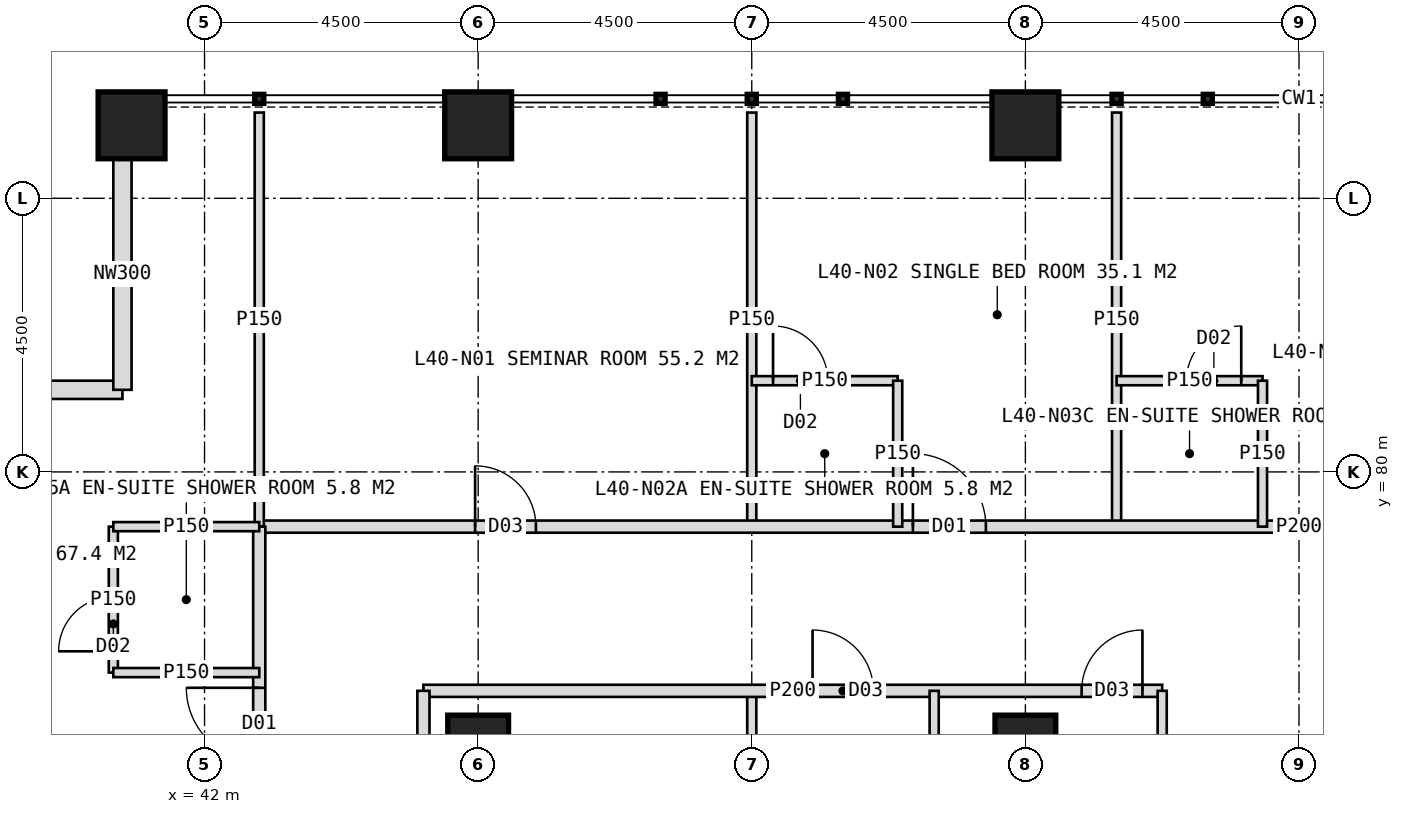
"""IFC4 building model, lengths in metres.
Left out: names, types, materials, properties, quantities, classifications, styles, units other than length and angle.
Written with IfcOpenShell. Run it as: python <this file> out.ifc"""

import sys

from ifc_helpers import new_model, si_unit, direction, frame, frame_2d, origin, origin_2d, place, context, subcontext, project, spatial, rectangle, hollow_rectangle, extrude, element, fill, save


model = new_model("IFC4")
c1 = context("Model", 3, precision=1e-05, world=origin(), true_north=direction((0.0, 1.0)))
c2 = subcontext(c1, "Body", "Model", "MODEL_VIEW")
j1 = project(units=[si_unit("LENGTHUNIT", "METRE"), si_unit("PLANEANGLEUNIT", "RADIAN")], contexts=[c1])
p1 = place(None, origin())
s1 = spatial("IfcSite", under=j1, at=p1, CompositionType="ELEMENT")
p2 = place(p1, origin())
s2 = spatial("IfcBuilding", under=s1, at=p2, CompositionType="ELEMENT")
p3 = place(p2, frame((0.0, 0.0, 168.0)))
s3 = spatial("IfcBuildingStorey", under=s2, at=p3, CompositionType="ELEMENT", Elevation=168.0)
for number, where, z_axis, x_axis in (
    (1, (46.5, 75.5, 0.0), (0.0, 0.0, 1.0), (1.0, 0.0, 0.0)),
    (2, (55.5, 75.5, 0.0), (0.0, 0.0, 1.0), (1.0, 0.0, 0.0)),
):
    element("IfcColumn", number, at=place(p3, frame(where, z_axis=z_axis, x_axis=x_axis)), inside=s3, PredefinedType="COLUMN", context=c2, shape_type="SweptSolid", body=[
        extrude(hollow_rectangle(XDim=1.0, YDim=1.0, WallThickness=0.1, at=origin_2d()), origin(), (0.0, 0.0, 1.0), 4.0),
    ])
for number, where, z_axis, x_axis in (
    (3, (40.8, 85.7, 0.0), (0.0, 0.0, 1.0), (1.0, 0.0, 0.0)),
    (4, (46.5, 85.7, 0.0), (0.0, 0.0, 1.0), (1.0, 0.0, 0.0)),
    (5, (55.5, 85.7, 0.0), (0.0, 0.0, 1.0), (1.0, 0.0, 0.0)),
):
    element("IfcColumn", number, at=place(p3, frame(where, z_axis=z_axis, x_axis=x_axis)), inside=s3, PredefinedType="COLUMN", context=c2, shape_type="SweptSolid", body=[
        extrude(hollow_rectangle(XDim=1.1, YDim=1.1, WallThickness=0.1, at=origin_2d()), origin(), (0.0, 0.0, 1.0), 4.0),
    ])
for number, where, z_axis, x_axis in (
    (6, (36.85, 81.35, 0.0), (0.0, 0.0, 1.0), (1.0, 0.0, 0.0)),
    (7, (40.65, 81.35, 0.0), (0.0, 0.0, 1.0), (0.0, 1.0, 0.0)),
):
    element("IfcWall", number, at=place(p3, frame(where, z_axis=z_axis, x_axis=x_axis)), inside=s3, PredefinedType="ELEMENTEDWALL", context=c2, shape_type="SweptSolid", body=[
        extrude(rectangle(XDim=3.8, YDim=0.3, at=frame_2d((1.9, 0.0))), origin(), (0.0, 0.0, 1.0), 4.0),
    ])
for number, where, z_axis, x_axis in (
    (8, (51.0, 79.1, 0.0), (0.0, 0.0, 1.0), (0.0, 1.0, 0.0)),
    (9, (57.0, 79.1, 0.0), (0.0, 0.0, 1.0), (0.0, 1.0, 0.0)),
):
    element("IfcWall", number, at=place(p3, frame(where, z_axis=z_axis, x_axis=x_axis)), inside=s3, PredefinedType="PARTITIONING", context=c2, shape_type="SweptSolid", body=[
        extrude(rectangle(XDim=6.81, YDim=0.15, at=frame_2d((3.405, 0.0))), origin(), (0.0, 0.0, 1.0), 3.75),
    ])
p4 = place(p3, frame((42.9, 79.1, 0.0), z_axis=(0.0, 0.0, 1.0), x_axis=(1.0, 0.0, 0.0)))
e10 = element("IfcWall", 10, at=p4, inside=s3, PredefinedType="PARTITIONING", context=c2, shape_type="SweptSolid", body=[
    extrude(rectangle(XDim=34.2, YDim=0.2, at=frame_2d((17.1, 0.0))), origin(), (0.0, 0.0, 1.0), 3.75),
])
p5 = place(p4, frame((3.55, 0.0, 0.0)))
e11 = element("IfcOpeningElement", 11, at=p5, cuts=e10, PredefinedType="OPENING", context=c2, shape_type="SweptSolid", body=[
    extrude(rectangle(XDim=1.0, YDim=2.1, at=frame_2d((0.5, 1.05))), frame((0.0, 0.11, 0.0), z_axis=(0.0, -1.0, 0.0), x_axis=(1.0, 0.0, 0.0)), (0.0, 0.0, 1.0), 0.22),
])
p6 = place(p4, frame((10.75, 0.0, 0.0)))
e12 = element("IfcOpeningElement", 12, at=p6, cuts=e10, PredefinedType="OPENING", context=c2, shape_type="SweptSolid", body=[
    extrude(rectangle(XDim=1.2, YDim=2.2, at=frame_2d((0.6, 1.1))), frame((0.0, 0.11, 0.0), z_axis=(0.0, -1.0, 0.0), x_axis=(1.0, 0.0, 0.0)), (0.0, 0.0, 1.0), 0.22),
])
p7 = place(p4, frame((20.75, 0.0, 0.0)))
e13 = element("IfcOpeningElement", 13, at=p7, cuts=e10, PredefinedType="OPENING", context=c2, shape_type="SweptSolid", body=[
    extrude(rectangle(XDim=1.2, YDim=2.2, at=frame_2d((0.6, 1.1))), frame((0.0, 0.11, 0.0), z_axis=(0.0, -1.0, 0.0), x_axis=(1.0, 0.0, 0.0)), (0.0, 0.0, 1.0), 0.22),
])
p8 = place(p4, frame((27.25, 0.0, 0.0)))
e14 = element("IfcOpeningElement", 14, at=p8, cuts=e10, PredefinedType="OPENING", context=c2, shape_type="SweptSolid", body=[
    extrude(rectangle(XDim=1.2, YDim=2.2, at=frame_2d((0.6, 1.1))), frame((0.0, 0.11, 0.0), z_axis=(0.0, -1.0, 0.0), x_axis=(1.0, 0.0, 0.0)), (0.0, 0.0, 1.0), 0.22),
])
p9 = place(p3, frame((42.9, 79.1, 0.0), z_axis=(0.0, 0.0, 1.0), x_axis=(0.0, 1.0, 0.0)))
e15 = element("IfcWall", 15, at=p9, inside=s3, PredefinedType="PARTITIONING", context=c2, shape_type="SweptSolid", body=[
    extrude(rectangle(XDim=6.81, YDim=0.15, at=frame_2d((3.405, 0.0))), origin(), (0.0, 0.0, 1.0), 3.75),
])
p10 = place(p3, frame((51.0, 81.5, 0.0), z_axis=(0.0, 0.0, 1.0), x_axis=(1.0, 0.0, 0.0)))
e16 = element("IfcWall", 16, at=p10, inside=s3, PredefinedType="PARTITIONING", context=c2, shape_type="SweptSolid", body=[
    extrude(rectangle(XDim=2.4, YDim=0.15, at=frame_2d((1.2, 0.0))), origin(), (0.0, 0.0, 1.0), 3.75),
])
p11 = place(p10, frame((0.35, 0.0, 0.0)))
e17 = element("IfcOpeningElement", 17, at=p11, cuts=e16, PredefinedType="OPENING", context=c2, shape_type="SweptSolid", body=[
    extrude(rectangle(XDim=0.9, YDim=2.1, at=frame_2d((0.45, 1.05))), frame((0.0, 0.085, 0.0), z_axis=(0.0, -1.0, 0.0), x_axis=(1.0, 0.0, 0.0)), (0.0, 0.0, 1.0), 0.17),
])
p12 = place(p3, frame((53.4, 79.1, 0.0), z_axis=(0.0, 0.0, 1.0), x_axis=(0.0, 1.0, 0.0)))
e18 = element("IfcWall", 18, at=p12, inside=s3, PredefinedType="PARTITIONING", context=c2, shape_type="SweptSolid", body=[
    extrude(rectangle(XDim=2.4, YDim=0.15, at=frame_2d((1.2, 0.0))), origin(), (0.0, 0.0, 1.0), 3.75),
])
p13 = place(p3, frame((57.0, 81.5, 0.0), z_axis=(0.0, 0.0, 1.0), x_axis=(1.0, 0.0, 0.0)))
e19 = element("IfcWall", 19, at=p13, inside=s3, PredefinedType="PARTITIONING", context=c2, shape_type="SweptSolid", body=[
    extrude(rectangle(XDim=2.4, YDim=0.15, at=frame_2d((1.2, 0.0))), origin(), (0.0, 0.0, 1.0), 3.75),
])
p14 = place(p13, frame((1.15, 0.0, 0.0)))
e20 = element("IfcOpeningElement", 20, at=p14, cuts=e19, PredefinedType="OPENING", context=c2, shape_type="SweptSolid", body=[
    extrude(rectangle(XDim=0.9, YDim=2.1, at=frame_2d((0.45, 1.05))), frame((0.0, 0.085, 0.0), z_axis=(0.0, -1.0, 0.0), x_axis=(1.0, 0.0, 0.0)), (0.0, 0.0, 1.0), 0.17),
])
p15 = place(p3, frame((59.4, 79.1, 0.0), z_axis=(0.0, 0.0, 1.0), x_axis=(0.0, 1.0, 0.0)))
e21 = element("IfcWall", 21, at=p15, inside=s3, PredefinedType="PARTITIONING", context=c2, shape_type="SweptSolid", body=[
    extrude(rectangle(XDim=2.4, YDim=0.15, at=frame_2d((1.2, 0.0))), origin(), (0.0, 0.0, 1.0), 3.75),
])
p16 = place(p3, frame((51.0, 71.0, 0.0), z_axis=(0.0, 0.0, 1.0), x_axis=(0.0, 1.0, 0.0)))
e22 = element("IfcWall", 22, at=p16, inside=s3, PredefinedType="PARTITIONING", context=c2, shape_type="SweptSolid", body=[
    extrude(rectangle(XDim=5.4, YDim=0.15, at=frame_2d((2.7, 0.0))), origin(), (0.0, 0.0, 1.0), 3.75),
])
p17 = place(p3, frame((45.6, 76.4, 0.0), z_axis=(0.0, 0.0, 1.0), x_axis=(1.0, 0.0, 0.0)))
e23 = element("IfcWall", 23, at=p17, inside=s3, PredefinedType="PARTITIONING", context=c2, shape_type="SweptSolid", body=[
    extrude(rectangle(XDim=12.15, YDim=0.2, at=frame_2d((6.075, 0.0))), origin(), (0.0, 0.0, 1.0), 3.75),
])
p18 = place(p17, frame((6.4, 0.0, 0.0)))
e24 = element("IfcOpeningElement", 24, at=p18, cuts=e23, PredefinedType="OPENING", context=c2, shape_type="SweptSolid", body=[
    extrude(rectangle(XDim=1.0, YDim=2.1, at=frame_2d((0.5, 1.05))), frame((0.0, 0.11, 0.0), z_axis=(0.0, -1.0, 0.0), x_axis=(1.0, 0.0, 0.0)), (0.0, 0.0, 1.0), 0.22),
])
p19 = place(p17, frame((10.825, 0.0, 0.0)))
e25 = element("IfcOpeningElement", 25, at=p19, cuts=e23, PredefinedType="OPENING", context=c2, shape_type="SweptSolid", body=[
    extrude(rectangle(XDim=1.0, YDim=2.1, at=frame_2d((0.5, 1.05))), frame((0.0, 0.11, 0.0), z_axis=(0.0, -1.0, 0.0), x_axis=(1.0, 0.0, 0.0)), (0.0, 0.0, 1.0), 0.22),
])
p20 = place(p3, frame((57.75, 71.0, 0.0), z_axis=(0.0, 0.0, 1.0), x_axis=(0.0, 1.0, 0.0)))
e26 = element("IfcWall", 26, at=p20, inside=s3, PredefinedType="PARTITIONING", context=c2, shape_type="SweptSolid", body=[
    extrude(rectangle(XDim=5.4, YDim=0.15, at=frame_2d((2.7, 0.0))), origin(), (0.0, 0.0, 1.0), 3.75),
])
p21 = place(p20, frame((0.6, 0.0, 0.0)))
e27 = element("IfcOpeningElement", 27, at=p21, cuts=e26, PredefinedType="OPENING", context=c2, shape_type="SweptSolid", body=[
    extrude(rectangle(XDim=0.9, YDim=2.1, at=frame_2d((0.45, 1.05))), frame((0.0, 0.085, 0.0), z_axis=(0.0, -1.0, 0.0), x_axis=(1.0, 0.0, 0.0)), (0.0, 0.0, 1.0), 0.17),
])
p22 = place(p3, frame((54.0, 71.0, 0.0), z_axis=(0.0, 0.0, 1.0), x_axis=(0.0, 1.0, 0.0)))
e28 = element("IfcWall", 28, at=p22, inside=s3, PredefinedType="PARTITIONING", context=c2, shape_type="SweptSolid", body=[
    extrude(rectangle(XDim=5.4, YDim=0.15, at=frame_2d((2.7, 0.0))), origin(), (0.0, 0.0, 1.0), 3.75),
])
p23 = place(p3, frame((42.9, 44.9, 0.0), z_axis=(0.0, 0.0, 1.0), x_axis=(0.0, 1.0, 0.0)))
e29 = element("IfcWall", 29, at=p23, inside=s3, PredefinedType="PARTITIONING", context=c2, shape_type="SweptSolid", body=[
    extrude(rectangle(XDim=34.2, YDim=0.2, at=frame_2d((17.1, 0.0))), origin(), (0.0, 0.0, 1.0), 3.75),
])
p24 = place(p23, frame((2.15, 0.0, 0.0)))
e30 = element("IfcOpeningElement", 30, at=p24, cuts=e29, PredefinedType="OPENING", context=c2, shape_type="SweptSolid", body=[
    extrude(rectangle(XDim=1.2, YDim=2.2, at=frame_2d((0.6, 1.1))), frame((0.0, 0.11, 0.0), z_axis=(0.0, -1.0, 0.0), x_axis=(1.0, 0.0, 0.0)), (0.0, 0.0, 1.0), 0.22),
])
p25 = place(p23, frame((9.25, 0.0, 0.0)))
e31 = element("IfcOpeningElement", 31, at=p25, cuts=e29, PredefinedType="OPENING", context=c2, shape_type="SweptSolid", body=[
    extrude(rectangle(XDim=1.2, YDim=2.2, at=frame_2d((0.6, 1.1))), frame((0.0, 0.11, 0.0), z_axis=(0.0, -1.0, 0.0), x_axis=(1.0, 0.0, 0.0)), (0.0, 0.0, 1.0), 0.22),
])
p26 = place(p23, frame((13.25, 0.0, 0.0)))
e32 = element("IfcOpeningElement", 32, at=p26, cuts=e29, PredefinedType="OPENING", context=c2, shape_type="SweptSolid", body=[
    extrude(rectangle(XDim=1.2, YDim=2.2, at=frame_2d((0.6, 1.1))), frame((0.0, 0.11, 0.0), z_axis=(0.0, -1.0, 0.0), x_axis=(1.0, 0.0, 0.0)), (0.0, 0.0, 1.0), 0.22),
])
p27 = place(p23, frame((19.75, 0.0, 0.0)))
e33 = element("IfcOpeningElement", 33, at=p27, cuts=e29, PredefinedType="OPENING", context=c2, shape_type="SweptSolid", body=[
    extrude(rectangle(XDim=1.2, YDim=2.2, at=frame_2d((0.6, 1.1))), frame((0.0, 0.11, 0.0), z_axis=(0.0, -1.0, 0.0), x_axis=(1.0, 0.0, 0.0)), (0.0, 0.0, 1.0), 0.22),
])
p28 = place(p23, frame((30.35, 0.0, 0.0)))
e34 = element("IfcOpeningElement", 34, at=p28, cuts=e29, PredefinedType="OPENING", context=c2, shape_type="SweptSolid", body=[
    extrude(rectangle(XDim=1.2, YDim=2.2, at=frame_2d((0.6, 1.1))), frame((0.0, 0.11, 0.0), z_axis=(0.0, -1.0, 0.0), x_axis=(1.0, 0.0, 0.0)), (0.0, 0.0, 1.0), 0.22),
])
p29 = place(p3, frame((40.5, 76.7, 0.0), z_axis=(0.0, 0.0, 1.0), x_axis=(0.0, 1.0, 0.0)))
e35 = element("IfcWall", 35, at=p29, inside=s3, PredefinedType="PARTITIONING", context=c2, shape_type="SweptSolid", body=[
    extrude(rectangle(XDim=2.4, YDim=0.15, at=frame_2d((1.2, 0.0))), origin(), (0.0, 0.0, 1.0), 3.75),
])
p30 = place(p29, frame((0.35, 0.0, 0.0)))
e36 = element("IfcOpeningElement", 36, at=p30, cuts=e35, PredefinedType="OPENING", context=c2, shape_type="SweptSolid", body=[
    extrude(rectangle(XDim=0.9, YDim=2.1, at=frame_2d((0.45, 1.05))), frame((0.0, 0.085, 0.0), z_axis=(0.0, -1.0, 0.0), x_axis=(1.0, 0.0, 0.0)), (0.0, 0.0, 1.0), 0.17),
])
for number, where, z_axis, x_axis in (
    (37, (42.9, 76.7, 0.0), (0.0, 0.0, 1.0), (-1.0, 0.0, 0.0)),
    (38, (42.9, 79.1, 0.0), (0.0, 0.0, 1.0), (-1.0, 0.0, 0.0)),
):
    element("IfcWall", number, at=place(p3, frame(where, z_axis=z_axis, x_axis=x_axis)), inside=s3, PredefinedType="PARTITIONING", context=c2, shape_type="SweptSolid", body=[
        extrude(rectangle(XDim=2.4, YDim=0.15, at=frame_2d((1.2, 0.0))), origin(), (0.0, 0.0, 1.0), 3.75),
    ])
p31 = place(p3, frame((45.6, 62.0, 0.0), z_axis=(0.0, 0.0, 1.0), x_axis=(0.0, 1.0, 0.0)))
e39 = element("IfcWall", 39, at=p31, inside=s3, PredefinedType="PARTITIONING", context=c2, shape_type="SweptSolid", body=[
    extrude(rectangle(XDim=14.4, YDim=0.2, at=frame_2d((7.2, 0.0))), origin(), (0.0, 0.0, 1.0), 3.75),
])
p32 = place(p31, frame((1.45, 0.0, 0.0)))
e40 = element("IfcOpeningElement", 40, at=p32, cuts=e39, PredefinedType="OPENING", context=c2, shape_type="SweptSolid", body=[
    extrude(rectangle(XDim=1.0, YDim=2.1, at=frame_2d((0.5, 1.05))), frame((0.0, 0.11, 0.0), z_axis=(0.0, -1.0, 0.0), x_axis=(1.0, 0.0, 0.0)), (0.0, 0.0, 1.0), 0.22),
])
p33 = place(p31, frame((11.2, 0.0, 0.0)))
e41 = element("IfcOpeningElement", 41, at=p33, cuts=e39, PredefinedType="OPENING", context=c2, shape_type="SweptSolid", body=[
    extrude(rectangle(XDim=1.0, YDim=2.1, at=frame_2d((0.5, 1.05))), frame((0.0, 0.11, 0.0), z_axis=(0.0, -1.0, 0.0), x_axis=(1.0, 0.0, 0.0)), (0.0, 0.0, 1.0), 0.22),
])
p34 = place(p5, origin())
e42 = element("IfcDoor", 42, at=p34, inside=s3, OperationType="SINGLE_SWING_LEFT", PredefinedType="DOOR", context=c2, shape_type="SweptSolid", body=[
    extrude(rectangle(XDim=1.0, YDim=2.1, at=frame_2d((0.5, 1.05))), frame((0.0, 0.025, 0.0), z_axis=(0.0, -1.0, 0.0), x_axis=(1.0, 0.0, 0.0)), (0.0, 0.0, 1.0), 0.05),
])
fill(e11, e42)
p35 = place(p6, origin())
e43 = element("IfcDoor", 43, at=p35, inside=s3, OperationType="SINGLE_SWING_LEFT", PredefinedType="DOOR", context=c2, shape_type="SweptSolid", body=[
    extrude(rectangle(XDim=1.2, YDim=2.2, at=frame_2d((0.6, 1.1))), frame((0.0, 0.025, 0.0), z_axis=(0.0, -1.0, 0.0), x_axis=(1.0, 0.0, 0.0)), (0.0, 0.0, 1.0), 0.05),
])
fill(e12, e43)
p36 = place(p11, origin())
e44 = element("IfcDoor", 44, at=p36, inside=s3, OperationType="SINGLE_SWING_LEFT", PredefinedType="DOOR", context=c2, shape_type="SweptSolid", body=[
    extrude(rectangle(XDim=0.9, YDim=2.1, at=frame_2d((0.45, 1.05))), frame((0.0, 0.025, 0.0), z_axis=(0.0, -1.0, 0.0), x_axis=(1.0, 0.0, 0.0)), (0.0, 0.0, 1.0), 0.05),
])
fill(e17, e44)
p37 = place(p14, origin())
e45 = element("IfcDoor", 45, at=p37, inside=s3, OperationType="SINGLE_SWING_RIGHT", PredefinedType="DOOR", context=c2, shape_type="SweptSolid", body=[
    extrude(rectangle(XDim=0.9, YDim=2.1, at=frame_2d((0.45, 1.05))), frame((0.0, 0.025, 0.0), z_axis=(0.0, -1.0, 0.0), x_axis=(1.0, 0.0, 0.0)), (0.0, 0.0, 1.0), 0.05),
])
fill(e20, e45)
p38 = place(p18, origin())
e46 = element("IfcDoor", 46, at=p38, inside=s3, OperationType="SINGLE_SWING_LEFT", PredefinedType="DOOR", context=c2, shape_type="SweptSolid", body=[
    extrude(rectangle(XDim=1.0, YDim=2.1, at=frame_2d((0.5, 1.05))), frame((0.0, 0.025, 0.0), z_axis=(0.0, -1.0, 0.0), x_axis=(1.0, 0.0, 0.0)), (0.0, 0.0, 1.0), 0.05),
])
fill(e24, e46)
p39 = place(p19, origin())
e47 = element("IfcDoor", 47, at=p39, inside=s3, OperationType="SINGLE_SWING_RIGHT", PredefinedType="DOOR", context=c2, shape_type="SweptSolid", body=[
    extrude(rectangle(XDim=1.0, YDim=2.1, at=frame_2d((0.5, 1.05))), frame((0.0, 0.025, 0.0), z_axis=(0.0, -1.0, 0.0), x_axis=(1.0, 0.0, 0.0)), (0.0, 0.0, 1.0), 0.05),
])
fill(e25, e47)
p40 = place(p28, origin())
e48 = element("IfcDoor", 48, at=p40, inside=s3, OperationType="SINGLE_SWING_RIGHT", PredefinedType="DOOR", context=c2, shape_type="SweptSolid", body=[
    extrude(rectangle(XDim=1.2, YDim=2.2, at=frame_2d((0.6, 1.1))), frame((0.0, 0.025, 0.0), z_axis=(0.0, -1.0, 0.0), x_axis=(1.0, 0.0, 0.0)), (0.0, 0.0, 1.0), 0.05),
])
fill(e34, e48)
p41 = place(p30, origin())
e49 = element("IfcDoor", 49, at=p41, inside=s3, OperationType="SINGLE_SWING_LEFT", PredefinedType="DOOR", context=c2, shape_type="SweptSolid", body=[
    extrude(rectangle(XDim=0.9, YDim=2.1, at=frame_2d((0.45, 1.05))), frame((0.0, 0.025, 0.0), z_axis=(0.0, -1.0, 0.0), x_axis=(1.0, 0.0, 0.0)), (0.0, 0.0, 1.0), 0.05),
])
fill(e36, e49)
save(model, sys.argv[1])
